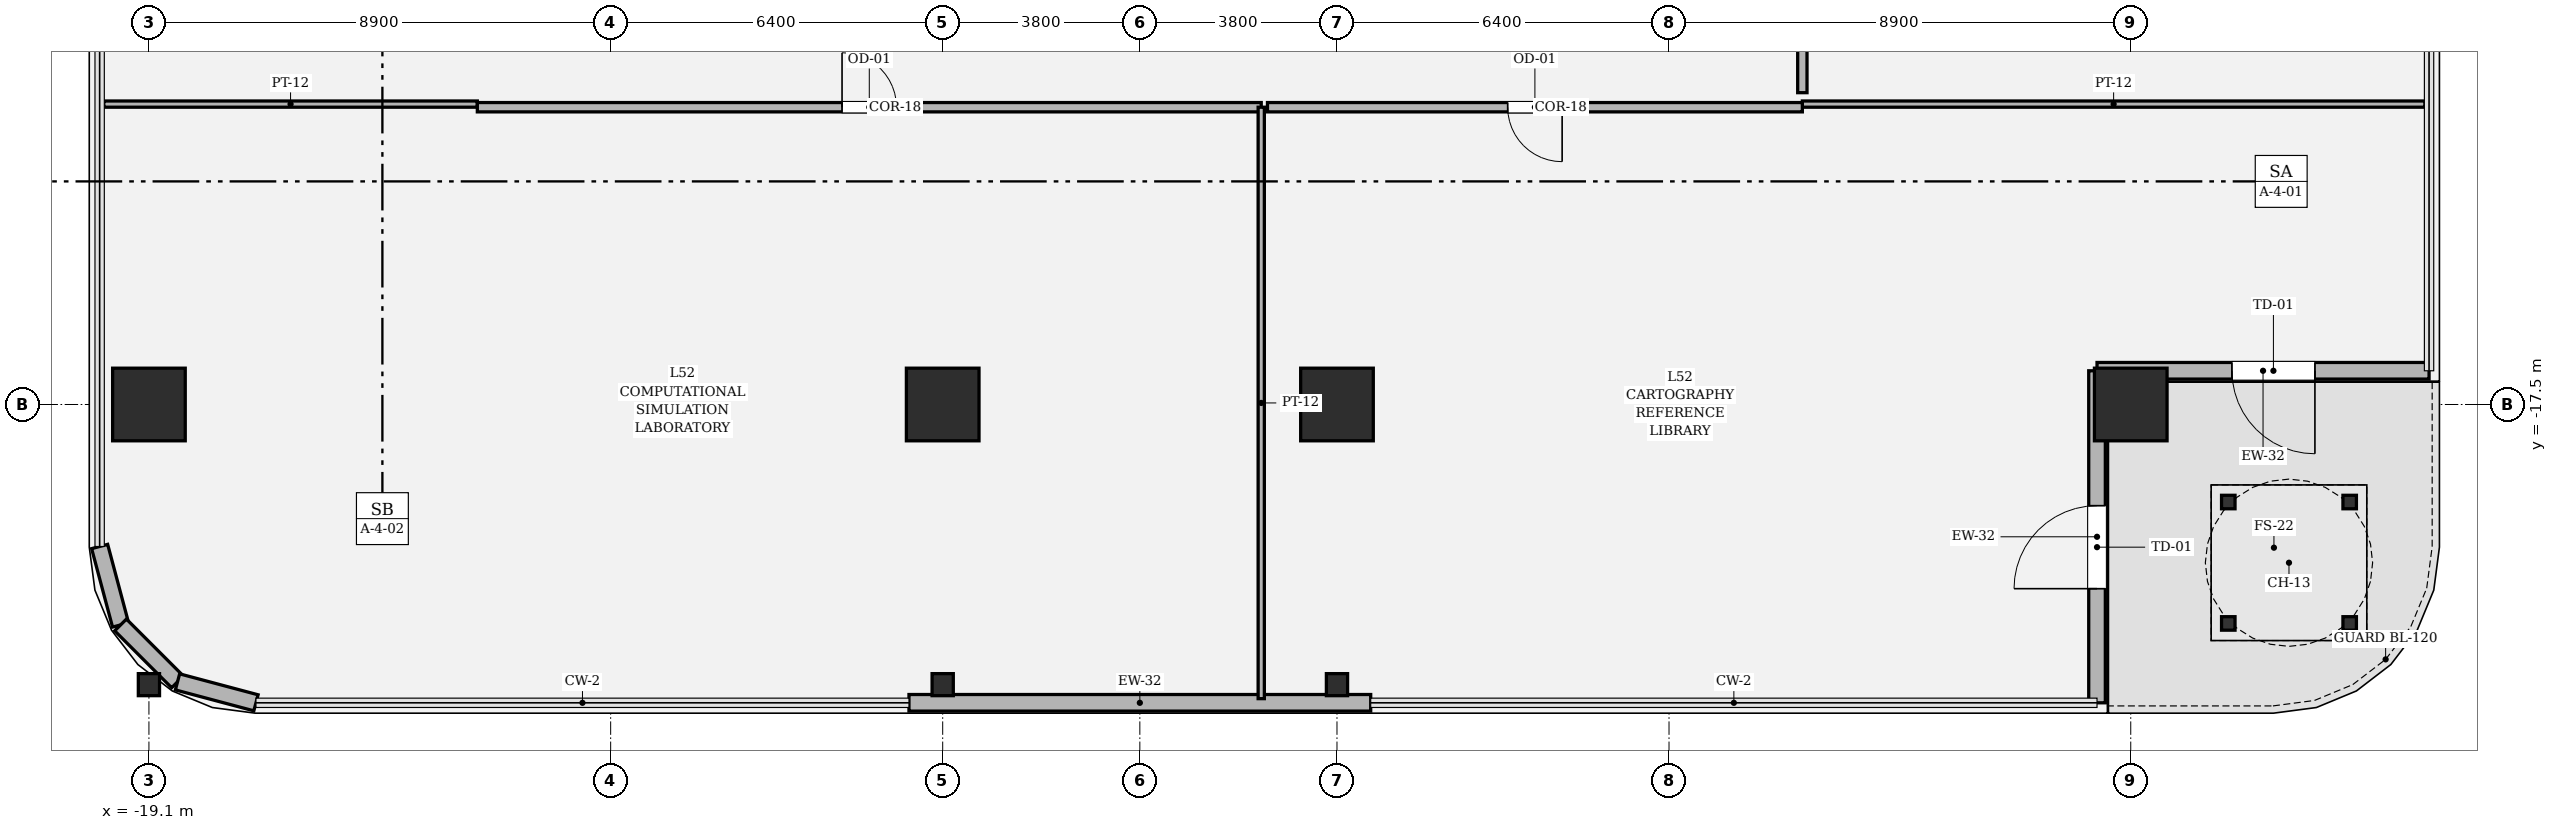
"""IFC4 building model, lengths in metres.
Left out: names, types, materials, properties, quantities, classifications, styles, units other than length and angle.
Written with IfcOpenShell. Run it as: python <this file> out.ifc"""

import sys

from ifc_helpers import new_model, si_unit, direction, frame, frame_2d, origin, origin_2d, place, context, subcontext, project, spatial, rectangle, hollow_rectangle, i_section, extrude, element, fill, save


model = new_model("IFC4")
c1 = context("Model", 3, precision=1e-05, world=origin(), true_north=direction((0.0, 1.0)))
c2 = subcontext(c1, "Body", "Model", "MODEL_VIEW")
j1 = project(units=[si_unit("LENGTHUNIT", "METRE"), si_unit("PLANEANGLEUNIT", "RADIAN")], contexts=[c1])
p1 = place(None, origin())
s1 = spatial("IfcSite", under=j1, at=p1, CompositionType="ELEMENT")
p2 = place(p1, origin())
s2 = spatial("IfcBuilding", under=s1, at=p2, CompositionType="ELEMENT")
p3 = place(p2, frame((0.0, 0.0, 220.8)))
s3 = spatial("IfcBuildingStorey", under=s2, at=p3, CompositionType="ELEMENT", Elevation=220.8)
for number, where, z_axis, x_axis in (
    (1, (-19.1, -17.5, 0.0), (0.0, 0.0, 1.0), (1.0, 0.0, 0.0)),
    (2, (-3.8, -17.5, 0.0), (0.0, 0.0, 1.0), (1.0, 0.0, 0.0)),
    (3, (3.8, -17.5, 0.0), (0.0, 0.0, 1.0), (1.0, 0.0, 0.0)),
    (4, (19.1, -17.5, 0.0), (0.0, 0.0, 1.0), (1.0, 0.0, 0.0)),
):
    element("IfcColumn", number, at=place(p3, frame(where, z_axis=z_axis, x_axis=x_axis)), inside=s3, PredefinedType="COLUMN", context=c2, shape_type="SweptSolid", body=[
        extrude(hollow_rectangle(XDim=1.4, YDim=1.4, WallThickness=0.042, at=origin_2d()), origin(), (0.0, 0.0, 1.0), 4.05),
    ])
for number, where, z_axis, x_axis in (
    (5, (-19.1, -22.9, 0.0), (0.0, 0.0, 1.0), (1.0, 0.0, 0.0)),
    (6, (-3.8, -22.9, 0.0), (0.0, 0.0, 1.0), (1.0, 0.0, 0.0)),
    (7, (3.8, -22.9, 0.0), (0.0, 0.0, 1.0), (1.0, 0.0, 0.0)),
):
    element("IfcColumn", number, at=place(p3, frame(where, z_axis=z_axis, x_axis=x_axis)), inside=s3, PredefinedType="COLUMN", context=c2, shape_type="SweptSolid", body=[
        extrude(i_section(OverallWidth=0.409, OverallDepth=0.425, WebThickness=0.032, FlangeThickness=0.052, FilletRadius=0.018, at=origin_2d()), origin(), (0.0, 0.0, 1.0), 4.048),
    ])
p4 = place(p3, frame((-4.45, -23.25, 0.0), z_axis=(0.0, 0.0, 1.0), x_axis=(1.0, 0.0, 0.0)))
e8 = element("IfcWall", 8, at=p4, inside=s3, PredefinedType="SOLIDWALL", context=c2, shape_type="SweptSolid", body=[
    extrude(rectangle(XDim=8.9, YDim=0.32, at=frame_2d((4.45, 0.0))), origin(), (0.0, 0.0, 1.0), 2.544),
])
p5 = place(p3, frame((18.45, -23.25, 0.0), z_axis=(0.0, 0.0, 1.0), x_axis=(0.0, 1.0, 0.0)))
e9 = element("IfcWall", 9, at=p5, inside=s3, PredefinedType="SOLIDWALL", context=c2, shape_type="SweptSolid", body=[
    extrude(rectangle(XDim=6.4, YDim=0.32, at=frame_2d((3.2, 0.0))), origin(), (0.0, 0.0, 1.0), 3.174),
])
p6 = place(p5, frame((2.2, 0.0, 0.0)))
e10 = element("IfcOpeningElement", 10, at=p6, cuts=e9, PredefinedType="OPENING", context=c2, shape_type="SweptSolid", body=[
    extrude(rectangle(XDim=1.6, YDim=2.35, at=frame_2d((0.8, 1.175))), frame((0.0, 0.17, 0.0), z_axis=(0.0, -1.0, 0.0), x_axis=(1.0, 0.0, 0.0)), (0.0, 0.0, 1.0), 0.34),
])
p7 = place(p3, frame((18.45, -16.85, 0.0), z_axis=(0.0, 0.0, 1.0), x_axis=(1.0, 0.0, 0.0)))
e11 = element("IfcWall", 11, at=p7, inside=s3, PredefinedType="SOLIDWALL", context=c2, shape_type="SweptSolid", body=[
    extrude(rectangle(XDim=6.4, YDim=0.32, at=frame_2d((3.2, 0.0))), origin(), (0.0, 0.0, 1.0), 3.174),
])
p8 = place(p7, frame((2.6, 0.0, 0.0)))
e12 = element("IfcOpeningElement", 12, at=p8, cuts=e11, PredefinedType="OPENING", context=c2, shape_type="SweptSolid", body=[
    extrude(rectangle(XDim=1.6, YDim=2.35, at=frame_2d((0.8, 1.175))), frame((0.0, 0.17, 0.0), z_axis=(0.0, -1.0, 0.0), x_axis=(1.0, 0.0, 0.0)), (0.0, 0.0, 1.0), 0.34),
])
p9 = place(p3, frame((-20.05, -20.237, 0.0), z_axis=(0.0, 0.0, 1.0), x_axis=(0.257847112249, -0.966185730957, 0.0)))
e13 = element("IfcWall", 13, at=p9, inside=s3, PredefinedType="SOLIDWALL", context=c2, shape_type="SweptSolid", body=[
    extrude(rectangle(XDim=1.565, YDim=0.32, at=frame_2d((0.783, 0.0))), origin(), (0.0, 0.0, 1.0), 3.83),
])
p10 = place(p3, frame((-19.646, -21.749, 0.0), z_axis=(0.0, 0.0, 1.0), x_axis=(0.707028130747, -0.707185422879, 0.0)))
e14 = element("IfcWall", 14, at=p10, inside=s3, PredefinedType="SOLIDWALL", context=c2, shape_type="SweptSolid", body=[
    extrude(rectangle(XDim=1.552, YDim=0.32, at=frame_2d((0.776, 0.0))), origin(), (0.0, 0.0, 1.0), 2.504),
])
p11 = place(p3, frame((-18.549, -22.847, 0.0), z_axis=(0.0, 0.0, 1.0), x_axis=(0.966224582397, -0.257701486942, 0.0)))
e15 = element("IfcWall", 15, at=p11, inside=s3, PredefinedType="SOLIDWALL", context=c2, shape_type="SweptSolid", body=[
    extrude(rectangle(XDim=1.565, YDim=0.32, at=frame_2d((0.783, 0.0))), origin(), (0.0, 0.0, 1.0), 2.544),
])
p12 = place(p3, frame((-19.97, -11.71, 0.0), z_axis=(0.0, 0.0, 1.0), x_axis=(1.0, 0.0, 0.0)))
e16 = element("IfcWall", 16, at=p12, inside=s3, PredefinedType="PARTITIONING", context=c2, shape_type="SweptSolid", body=[
    extrude(rectangle(XDim=7.2, YDim=0.12, at=frame_2d((3.6, 0.0))), origin(), (0.0, 0.0, 1.0), 3.174),
])
p13 = place(p3, frame((-12.77, -11.77, 0.0), z_axis=(0.0, 0.0, 1.0), x_axis=(1.0, 0.0, 0.0)))
e17 = element("IfcWall", 17, at=p13, inside=s3, PredefinedType="PARTITIONING", context=c2, shape_type="SweptSolid", body=[
    extrude(rectangle(XDim=15.11, YDim=0.18, at=frame_2d((7.555, 0.0))), origin(), (0.0, 0.0, 1.0), 3.174),
])
p14 = place(p13, frame((7.03, 0.0, 0.0)))
e18 = element("IfcOpeningElement", 18, at=p14, cuts=e17, PredefinedType="OPENING", context=c2, shape_type="SweptSolid", body=[
    extrude(rectangle(XDim=1.05, YDim=2.2, at=frame_2d((0.525, 1.1))), frame((0.0, 0.1, 0.0), z_axis=(0.0, -1.0, 0.0), x_axis=(1.0, 0.0, 0.0)), (0.0, 0.0, 1.0), 0.2),
])
p15 = place(p3, frame((2.34, -11.77, 0.0), z_axis=(0.0, 0.0, 1.0), x_axis=(0.0, -1.0, 0.0)))
e19 = element("IfcWall", 19, at=p15, inside=s3, PredefinedType="PARTITIONING", context=c2, shape_type="SweptSolid", body=[
    extrude(rectangle(XDim=11.4, YDim=0.12, at=frame_2d((5.7, 0.0))), origin(), (0.0, 0.0, 1.0), 2.544),
])
p16 = place(p3, frame((12.77, -11.71, 0.0), z_axis=(0.0, 0.0, 1.0), x_axis=(1.0, 0.0, 0.0)))
e20 = element("IfcWall", 20, at=p16, inside=s3, PredefinedType="PARTITIONING", context=c2, shape_type="SweptSolid", body=[
    extrude(rectangle(XDim=12.0, YDim=0.12, at=frame_2d((6.0, 0.0))), origin(), (0.0, 0.0, 1.0), 3.174),
])
p17 = place(p3, frame((2.46, -11.77, 0.0), z_axis=(0.0, 0.0, 1.0), x_axis=(1.0, 0.0, 0.0)))
e21 = element("IfcWall", 21, at=p17, inside=s3, PredefinedType="PARTITIONING", context=c2, shape_type="SweptSolid", body=[
    extrude(rectangle(XDim=10.31, YDim=0.18, at=frame_2d((5.155, 0.0))), origin(), (0.0, 0.0, 1.0), 3.174),
])
p18 = place(p17, frame((4.63, 0.0, 0.0)))
e22 = element("IfcOpeningElement", 22, at=p18, cuts=e21, PredefinedType="OPENING", context=c2, shape_type="SweptSolid", body=[
    extrude(rectangle(XDim=1.05, YDim=2.2, at=frame_2d((0.525, 1.1))), frame((0.0, 0.1, 0.0), z_axis=(0.0, -1.0, 0.0), x_axis=(1.0, 0.0, 0.0)), (0.0, 0.0, 1.0), 0.2),
])
p19 = place(p3, frame((12.77, -11.49, 0.0), z_axis=(0.0, 0.0, 1.0), x_axis=(0.0, 1.0, 0.0)))
e23 = element("IfcWall", 23, at=p19, inside=s3, PredefinedType="PARTITIONING", context=c2, shape_type="SweptSolid", body=[
    extrude(rectangle(XDim=8.476, YDim=0.18, at=frame_2d((4.238, 0.0))), origin(), (0.0, 0.0, 1.0), 3.174),
])
p20 = place(p19, frame((3.713, 0.0, 0.0)))
e24 = element("IfcOpeningElement", 24, at=p20, cuts=e23, PredefinedType="OPENING", context=c2, shape_type="SweptSolid", body=[
    extrude(rectangle(XDim=1.05, YDim=2.2, at=frame_2d((0.525, 1.1))), frame((0.0, 0.1, 0.0), z_axis=(0.0, -1.0, 0.0), x_axis=(1.0, 0.0, 0.0)), (0.0, 0.0, 1.0), 0.2),
])
p21 = place(p6, origin())
e25 = element("IfcDoor", 25, at=p21, inside=s3, OperationType="SINGLE_SWING_LEFT", PredefinedType="DOOR", context=c2, shape_type="SweptSolid", body=[
    extrude(rectangle(XDim=1.6, YDim=2.35, at=frame_2d((0.8, 1.175))), frame((0.0, 0.025, 0.0), z_axis=(0.0, -1.0, 0.0), x_axis=(1.0, 0.0, 0.0)), (0.0, 0.0, 1.0), 0.05),
])
fill(e10, e25)
p22 = place(p8, origin())
e26 = element("IfcDoor", 26, at=p22, inside=s3, OperationType="SINGLE_SWING_RIGHT", PredefinedType="DOOR", context=c2, shape_type="SweptSolid", body=[
    extrude(rectangle(XDim=1.6, YDim=2.35, at=frame_2d((0.8, 1.175))), frame((0.0, 0.025, 0.0), z_axis=(0.0, -1.0, 0.0), x_axis=(1.0, 0.0, 0.0)), (0.0, 0.0, 1.0), 0.05),
])
fill(e12, e26)
p23 = place(p14, origin())
e27 = element("IfcDoor", 27, at=p23, inside=s3, OperationType="SINGLE_SWING_LEFT", PredefinedType="DOOR", context=c2, shape_type="SweptSolid", body=[
    extrude(rectangle(XDim=1.05, YDim=2.2, at=frame_2d((0.525, 1.1))), frame((0.0, 0.025, 0.0), z_axis=(0.0, -1.0, 0.0), x_axis=(1.0, 0.0, 0.0)), (0.0, 0.0, 1.0), 0.05),
])
fill(e18, e27)
p24 = place(p18, origin())
e28 = element("IfcDoor", 28, at=p24, inside=s3, OperationType="SINGLE_SWING_RIGHT", PredefinedType="DOOR", context=c2, shape_type="SweptSolid", body=[
    extrude(rectangle(XDim=1.05, YDim=2.2, at=frame_2d((0.525, 1.1))), frame((0.0, 0.025, 0.0), z_axis=(0.0, -1.0, 0.0), x_axis=(1.0, 0.0, 0.0)), (0.0, 0.0, 1.0), 0.05),
])
fill(e22, e28)
save(model, sys.argv[1])
